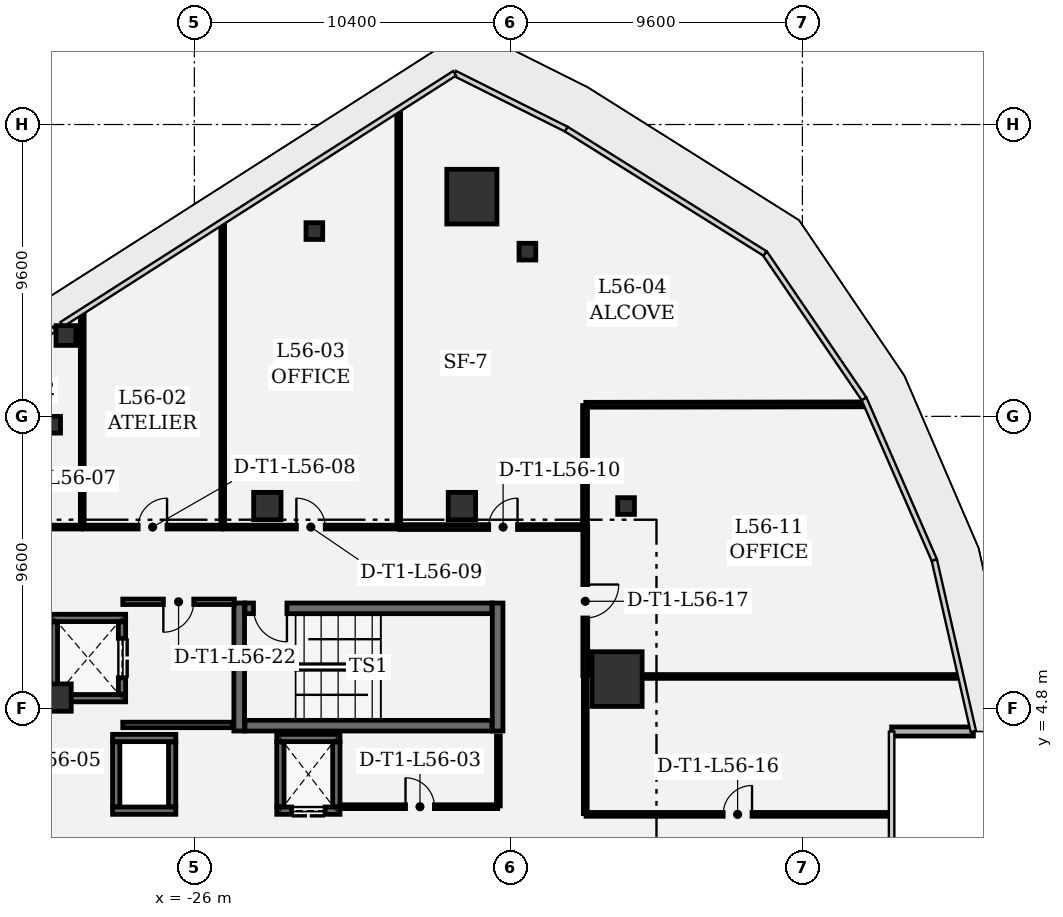
"""IFC4 building model, lengths in metres.
Left out: names, types, materials, properties, quantities, classifications, styles, units other than length and angle.
Written with IfcOpenShell. Run it as: python <this file> out.ifc"""

import sys

from ifc_helpers import new_model, si_unit, direction, frame, frame_2d, origin, origin_2d, place, context, subcontext, project, spatial, rectangle, extrude, element, fill, save


model = new_model("IFC4")
c1 = context("Model", 3, precision=1e-05, world=origin(), true_north=direction((0.0, 1.0)))
c2 = subcontext(c1, "Body", "Model", "MODEL_VIEW")
j1 = project(units=[si_unit("LENGTHUNIT", "METRE"), si_unit("PLANEANGLEUNIT", "RADIAN")], contexts=[c1])
p1 = place(None, origin())
s1 = spatial("IfcSite", under=j1, at=p1, CompositionType="ELEMENT")
p2 = place(p1, origin())
s2 = spatial("IfcBuilding", under=s1, at=p2, CompositionType="ELEMENT")
p3 = place(p2, frame((0.0, 0.0, 241.5)))
s3 = spatial("IfcBuildingStorey", under=s2, at=p3, CompositionType="ELEMENT", Elevation=241.5)
for number, where, z_axis, x_axis in (
    (1, (-12.097, 5.758, 0.0), (0.0, 0.0, 1.0), (1.0, 0.0, 0.0)),
    (2, (-16.872, 21.627, 0.0), (0.0, 0.0, 1.0), (1.0, 0.0, 0.0)),
):
    element("IfcColumn", number, at=place(p3, frame(where, z_axis=z_axis, x_axis=x_axis)), inside=s3, PredefinedType="COLUMN", context=c2, shape_type="SweptSolid", body=[
        extrude(rectangle(XDim=1.65, YDim=1.8, at=origin_2d()), origin(), (0.0, 0.0, 1.0), 4.05),
    ])
for number, where, z_axis, x_axis in (
    (3, (-23.6, 11.45, 0.0), (0.0, 0.0, 1.0), (1.0, 0.0, 0.0)),
    (4, (-17.2, 11.45, 0.0), (0.0, 0.0, 1.0), (1.0, 0.0, 0.0)),
    (5, (-30.5, 5.15, 0.0), (0.0, 0.0, 1.0), (1.0, 0.0, 0.0)),
):
    element("IfcColumn", number, at=place(p3, frame(where, z_axis=z_axis, x_axis=x_axis)), inside=s3, PredefinedType="COLUMN", context=c2, shape_type="SweptSolid", body=[
        extrude(rectangle(XDim=0.9, YDim=0.9, at=origin_2d()), origin(), (0.0, 0.0, 1.0), 4.05),
    ])
p4 = place(p3, frame((-30.225, 17.06, 0.0), z_axis=(0.0, 0.0, 1.0), x_axis=(1.0, 0.0, 0.0)))
e6 = element("IfcColumn", 6, at=p4, inside=s3, PredefinedType="COLUMN", context=c2, shape_type="SweptSolid", body=[
    extrude(rectangle(XDim=0.65, YDim=0.65, at=origin_2d()), origin(), (0.0, 0.0, 1.0), 4.05),
])
for number, where, z_axis, x_axis in (
    (7, (-22.053, 20.495, 0.0), (0.0, 0.0, 1.0), (1.0, 0.0, 0.0)),
    (8, (-30.677, 14.124, 0.0), (0.0, 0.0, 1.0), (1.0, 0.0, 0.0)),
    (9, (-15.046, 19.818, 0.0), (0.0, 0.0, 1.0), (1.0, 0.0, 0.0)),
    (10, (-11.8, 11.45, 0.0), (0.0, 0.0, 1.0), (1.0, 0.0, 0.0)),
):
    element("IfcColumn", number, at=place(p3, frame(where, z_axis=z_axis, x_axis=x_axis)), inside=s3, PredefinedType="COLUMN", context=c2, shape_type="SweptSolid", body=[
        extrude(rectangle(XDim=0.55, YDim=0.55, at=origin_2d()), origin(), (0.0, 0.0, 1.0), 4.05),
    ])
p5 = place(p3, frame((-3.066, 4.034, 0.0), z_axis=(0.0, 0.0, 1.0), x_axis=(1.0, 0.0, 0.0)))
e11 = element("IfcWall", 11, at=p5, inside=s3, PredefinedType="SOLIDWALL", context=c2, shape_type="SweptSolid", body=[
    extrude(rectangle(XDim=2.689, YDim=0.3, at=frame_2d((1.345, 0.0))), origin(), (0.0, 0.0, 1.0), 3.78),
])
for number, where, z_axis, x_axis in (
    (12, (-24.525, 8.26, 0.0), (0.0, 0.0, 1.0), (0.0, -1.0, 0.0)),
    (13, (-16.025, 4.05, 0.0), (0.0, 0.0, 1.0), (0.0, 1.0, 0.0)),
):
    element("IfcWall", number, at=place(p3, frame(where, z_axis=z_axis, x_axis=x_axis)), inside=s3, PredefinedType="SHEAR", context=c2, shape_type="SweptSolid", body=[
        extrude(rectangle(XDim=4.21, YDim=0.35, at=frame_2d((2.105, 0.0))), origin(), (0.0, 0.0, 1.0), 3.78),
    ])
p6 = place(p3, frame((-24.335, 4.225, 0.0), z_axis=(0.0, 0.0, 1.0), x_axis=(1.0, 0.0, 0.0)))
e14 = element("IfcWall", 14, at=p6, inside=s3, PredefinedType="SHEAR", context=c2, shape_type="SweptSolid", body=[
    extrude(rectangle(XDim=8.12, YDim=0.35, at=frame_2d((4.06, 0.0))), origin(), (0.0, 0.0, 1.0), 3.78),
])
p7 = place(p3, frame((-16.215, 8.085, 0.0), z_axis=(0.0, 0.0, 1.0), x_axis=(-1.0, 0.0, 0.0)))
e15 = element("IfcWall", 15, at=p7, inside=s3, PredefinedType="SHEAR", context=c2, shape_type="SweptSolid", body=[
    extrude(rectangle(XDim=8.12, YDim=0.35, at=frame_2d((4.06, 0.0))), origin(), (0.0, 0.0, 1.0), 3.78),
])
p8 = place(p7, frame((6.74, 0.0, 0.0)))
e16 = element("IfcOpeningElement", 16, at=p8, cuts=e15, PredefinedType="OPENING", context=c2, shape_type="SweptSolid", body=[
    extrude(rectangle(XDim=1.1, YDim=2.2, at=frame_2d((0.55, 1.1))), frame((0.0, 0.185, 0.0), z_axis=(0.0, -1.0, 0.0), x_axis=(1.0, 0.0, 0.0)), (0.0, 0.0, 1.0), 0.37),
])
for number, where, z_axis, x_axis in (
    (17, (-28.26, 5.13, 0.0), (0.0, 0.0, 1.0), (-1.0, 0.0, 0.0)),
    (18, (-30.74, 7.77, 0.0), (0.0, 0.0, 1.0), (1.0, 0.0, 0.0)),
):
    element("IfcWall", number, at=place(p3, frame(where, z_axis=z_axis, x_axis=x_axis)), inside=s3, PredefinedType="SHEAR", context=c2, shape_type="SweptSolid", body=[
        extrude(rectangle(XDim=2.48, YDim=0.24, at=frame_2d((1.24, 0.0))), origin(), (0.0, 0.0, 1.0), 3.78),
    ])
p9 = place(p3, frame((-30.62, 5.262, 0.0), z_axis=(0.0, 0.0, 1.0), x_axis=(0.0, 1.0, 0.0)))
e19 = element("IfcWall", 19, at=p9, inside=s3, PredefinedType="SHEAR", context=c2, shape_type="SweptSolid", body=[
    extrude(rectangle(XDim=2.376, YDim=0.24, at=frame_2d((1.188, 0.0))), origin(), (0.0, 0.0, 1.0), 3.78),
])
p10 = place(p3, frame((-28.38, 7.638, 0.0), z_axis=(0.0, 0.0, 1.0), x_axis=(0.0, -1.0, 0.0)))
e20 = element("IfcWall", 20, at=p10, inside=s3, PredefinedType="SHEAR", context=c2, shape_type="SweptSolid", body=[
    extrude(rectangle(XDim=2.376, YDim=0.24, at=frame_2d((1.188, 0.0))), origin(), (0.0, 0.0, 1.0), 3.78),
])
p11 = place(p10, frame((0.538, 0.0, 0.0)))
e21 = element("IfcOpeningElement", 21, at=p11, cuts=e20, PredefinedType="OPENING", context=c2, shape_type="SweptSolid", body=[
    extrude(rectangle(XDim=1.3, YDim=2.3, at=frame_2d((0.65, 1.15))), frame((0.0, 0.13, 0.0), z_axis=(0.0, -1.0, 0.0), x_axis=(1.0, 0.0, 0.0)), (0.0, 0.0, 1.0), 0.26),
])
for number, where, z_axis, x_axis in (
    (22, (-26.61, 1.43, 0.0), (0.0, 0.0, 1.0), (-1.0, 0.0, 0.0)),
    (23, (-28.69, 3.82, 0.0), (0.0, 0.0, 1.0), (1.0, 0.0, 0.0)),
):
    element("IfcWall", number, at=place(p3, frame(where, z_axis=z_axis, x_axis=x_axis)), inside=s3, PredefinedType="SHEAR", context=c2, shape_type="SweptSolid", body=[
        extrude(rectangle(XDim=2.08, YDim=0.24, at=frame_2d((1.04, 0.0))), origin(), (0.0, 0.0, 1.0), 3.78),
    ])
for number, where, z_axis, x_axis in (
    (24, (-28.57, 1.562, 0.0), (0.0, 0.0, 1.0), (0.0, 1.0, 0.0)),
    (25, (-26.73, 3.688, 0.0), (0.0, 0.0, 1.0), (0.0, -1.0, 0.0)),
):
    element("IfcWall", number, at=place(p3, frame(where, z_axis=z_axis, x_axis=x_axis)), inside=s3, PredefinedType="SHEAR", context=c2, shape_type="SweptSolid", body=[
        extrude(rectangle(XDim=2.126, YDim=0.24, at=frame_2d((1.063, 0.0))), origin(), (0.0, 0.0, 1.0), 3.78),
    ])
p12 = place(p3, frame((-21.21, 1.43, 0.0), z_axis=(0.0, 0.0, 1.0), x_axis=(-1.0, 0.0, 0.0)))
e26 = element("IfcWall", 26, at=p12, inside=s3, PredefinedType="SHEAR", context=c2, shape_type="SweptSolid", body=[
    extrude(rectangle(XDim=2.08, YDim=0.24, at=frame_2d((1.04, 0.0))), origin(), (0.0, 0.0, 1.0), 3.78),
])
p13 = place(p12, frame((0.49, 0.0, 0.0)))
e27 = element("IfcOpeningElement", 27, at=p13, cuts=e26, PredefinedType="OPENING", context=c2, shape_type="SweptSolid", body=[
    extrude(rectangle(XDim=1.1, YDim=2.2, at=frame_2d((0.55, 1.1))), frame((0.0, 0.13, 0.0), z_axis=(0.0, -1.0, 0.0), x_axis=(1.0, 0.0, 0.0)), (0.0, 0.0, 1.0), 0.26),
])
p14 = place(p3, frame((-23.29, 3.82, 0.0), z_axis=(0.0, 0.0, 1.0), x_axis=(1.0, 0.0, 0.0)))
e28 = element("IfcWall", 28, at=p14, inside=s3, PredefinedType="SHEAR", context=c2, shape_type="SweptSolid", body=[
    extrude(rectangle(XDim=2.08, YDim=0.24, at=frame_2d((1.04, 0.0))), origin(), (0.0, 0.0, 1.0), 3.78),
])
for number, where, z_axis, x_axis in (
    (29, (-23.17, 1.562, 0.0), (0.0, 0.0, 1.0), (0.0, 1.0, 0.0)),
    (30, (-21.33, 3.688, 0.0), (0.0, 0.0, 1.0), (0.0, -1.0, 0.0)),
):
    element("IfcWall", number, at=place(p3, frame(where, z_axis=z_axis, x_axis=x_axis)), inside=s3, PredefinedType="SHEAR", context=c2, shape_type="SweptSolid", body=[
        extrude(rectangle(XDim=2.126, YDim=0.24, at=frame_2d((1.063, 0.0))), origin(), (0.0, 0.0, 1.0), 3.78),
    ])
p15 = place(p3, frame((-28.355, 4.25, 0.0), z_axis=(0.0, 0.0, 1.0), x_axis=(1.0, 0.0, 0.0)))
e31 = element("IfcWall", 31, at=p15, inside=s3, PredefinedType="PARTITIONING", context=c2, shape_type="SweptSolid", body=[
    extrude(rectangle(XDim=3.622, YDim=0.18, at=frame_2d((1.811, 0.0))), origin(), (0.0, 0.0, 1.0), 3.78),
])
p16 = place(p3, frame((-24.684, 8.3, 0.0), z_axis=(0.0, 0.0, 1.0), x_axis=(-1.0, 0.0, 0.0)))
e32 = element("IfcWall", 32, at=p16, inside=s3, PredefinedType="PARTITIONING", context=c2, shape_type="SweptSolid", body=[
    extrude(rectangle(XDim=3.671, YDim=0.18, at=frame_2d((1.835, 0.0))), origin(), (0.0, 0.0, 1.0), 3.78),
])
p17 = place(p16, frame((1.335, 0.0, 0.0)))
e33 = element("IfcOpeningElement", 33, at=p17, cuts=e32, PredefinedType="OPENING", context=c2, shape_type="SweptSolid", body=[
    extrude(rectangle(XDim=1.0, YDim=2.15, at=frame_2d((0.5, 1.075))), frame((0.0, 0.1, 0.0), z_axis=(0.0, -1.0, 0.0), x_axis=(1.0, 0.0, 0.0)), (0.0, 0.0, 1.0), 0.2),
])
p18 = place(p3, frame((-21.134, 1.56, 0.0), z_axis=(0.0, 0.0, 1.0), x_axis=(1.0, 0.0, 0.0)))
e34 = element("IfcWall", 34, at=p18, inside=s3, PredefinedType="PARTITIONING", context=c2, shape_type="SweptSolid", body=[
    extrude(rectangle(XDim=5.109, YDim=0.125, at=frame_2d((2.554, 0.0))), origin(), (0.0, 0.0, 1.0), 3.78),
])
p19 = place(p18, frame((2.079, 0.0, 0.0)))
e35 = element("IfcOpeningElement", 35, at=p19, cuts=e34, PredefinedType="OPENING", context=c2, shape_type="SweptSolid", body=[
    extrude(rectangle(XDim=0.95, YDim=2.15, at=frame_2d((0.475, 1.075))), frame((0.0, 0.073, 0.0), z_axis=(0.0, -1.0, 0.0), x_axis=(1.0, 0.0, 0.0)), (0.0, 0.0, 1.0), 0.145),
])
p20 = place(p3, frame((-16.0, 1.585, 0.0), z_axis=(0.0, 0.0, 1.0), x_axis=(0.0, 1.0, 0.0)))
e36 = element("IfcWall", 36, at=p20, inside=s3, PredefinedType="PARTITIONING", context=c2, shape_type="SweptSolid", body=[
    extrude(rectangle(XDim=2.302, YDim=0.125, at=frame_2d((1.151, 0.0))), origin(), (0.0, 0.0, 1.0), 3.78),
])
p21 = place(p3, frame((-34.625, 10.758, 0.0), z_axis=(0.0, 0.0, 1.0), x_axis=(1.0, 0.0, 0.0)))
e37 = element("IfcWall", 37, at=p21, inside=s3, PredefinedType="PARTITIONING", context=c2, shape_type="SweptSolid", body=[
    extrude(rectangle(XDim=4.913, YDim=0.125, at=frame_2d((2.456, 0.0))), origin(), (0.0, 0.0, 1.0), 3.0),
])
p22 = place(p21, frame((1.981, 0.0, 0.0)))
e38 = element("IfcOpeningElement", 38, at=p22, cuts=e37, PredefinedType="OPENING", context=c2, shape_type="SweptSolid", body=[
    extrude(rectangle(XDim=0.95, YDim=2.15, at=frame_2d((0.475, 1.075))), frame((0.0, 0.073, 0.0), z_axis=(0.0, -1.0, 0.0), x_axis=(1.0, 0.0, 0.0)), (0.0, 0.0, 1.0), 0.145),
])
p23 = place(p3, frame((-29.687, 10.783, 0.0), z_axis=(0.0, 0.0, 1.0), x_axis=(0.0, 1.0, 0.0)))
e39 = element("IfcWall", 39, at=p23, inside=s3, PredefinedType="PARTITIONING", context=c2, shape_type="SweptSolid", body=[
    extrude(rectangle(XDim=6.992, YDim=0.125, at=frame_2d((3.496, 0.0))), origin(), (0.0, 0.0, 1.0), 3.78),
])
p24 = place(p3, frame((-29.654, 10.758, 0.0), z_axis=(0.0, 0.0, 1.0), x_axis=(1.0, 0.0, 0.0)))
e40 = element("IfcWall", 40, at=p24, inside=s3, PredefinedType="PARTITIONING", context=c2, shape_type="SweptSolid", body=[
    extrude(rectangle(XDim=4.562, YDim=0.125, at=frame_2d((2.281, 0.0))), origin(), (0.0, 0.0, 1.0), 3.78),
])
p25 = place(p24, frame((1.806, 0.0, 0.0)))
e41 = element("IfcOpeningElement", 41, at=p25, cuts=e40, PredefinedType="OPENING", context=c2, shape_type="SweptSolid", body=[
    extrude(rectangle(XDim=0.95, YDim=2.15, at=frame_2d((0.475, 1.075))), frame((0.0, 0.073, 0.0), z_axis=(0.0, -1.0, 0.0), x_axis=(1.0, 0.0, 0.0)), (0.0, 0.0, 1.0), 0.145),
])
p26 = place(p3, frame((-25.067, 10.783, 0.0), z_axis=(0.0, 0.0, 1.0), x_axis=(0.0, 1.0, 0.0)))
e42 = element("IfcWall", 42, at=p26, inside=s3, PredefinedType="PARTITIONING", context=c2, shape_type="SweptSolid", body=[
    extrude(rectangle(XDim=9.945, YDim=0.125, at=frame_2d((4.973, 0.0))), origin(), (0.0, 0.0, 1.0), 3.344),
])
p27 = place(p3, frame((-25.034, 10.758, 0.0), z_axis=(0.0, 0.0, 1.0), x_axis=(1.0, 0.0, 0.0)))
e43 = element("IfcWall", 43, at=p27, inside=s3, PredefinedType="PARTITIONING", context=c2, shape_type="SweptSolid", body=[
    extrude(rectangle(XDim=5.729, YDim=0.125, at=frame_2d((2.865, 0.0))), origin(), (0.0, 0.0, 1.0), 3.78),
])
p28 = place(p27, frame((2.39, 0.0, 0.0)))
e44 = element("IfcOpeningElement", 44, at=p28, cuts=e43, PredefinedType="OPENING", context=c2, shape_type="SweptSolid", body=[
    extrude(rectangle(XDim=0.95, YDim=2.15, at=frame_2d((0.475, 1.075))), frame((0.0, 0.073, 0.0), z_axis=(0.0, -1.0, 0.0), x_axis=(1.0, 0.0, 0.0)), (0.0, 0.0, 1.0), 0.145),
])
p29 = place(p3, frame((-19.28, 10.783, 0.0), z_axis=(0.0, 0.0, 1.0), x_axis=(0.0, 1.0, 0.0)))
e45 = element("IfcWall", 45, at=p29, inside=s3, PredefinedType="PARTITIONING", context=c2, shape_type="SweptSolid", body=[
    extrude(rectangle(XDim=13.644, YDim=0.125, at=frame_2d((6.822, 0.0))), origin(), (0.0, 0.0, 1.0), 2.977),
])
p30 = place(p3, frame((-19.247, 10.758, 0.0), z_axis=(0.0, 0.0, 1.0), x_axis=(1.0, 0.0, 0.0)))
e46 = element("IfcWall", 46, at=p30, inside=s3, PredefinedType="PARTITIONING", context=c2, shape_type="SweptSolid", body=[
    extrude(rectangle(XDim=6.072, YDim=0.16, at=frame_2d((3.036, 0.0))), origin(), (0.0, 0.0, 1.0), 3.344),
])
p31 = place(p30, frame((2.927, 0.0, 0.0)))
e47 = element("IfcOpeningElement", 47, at=p31, cuts=e46, PredefinedType="OPENING", context=c2, shape_type="SweptSolid", body=[
    extrude(rectangle(XDim=0.95, YDim=2.15, at=frame_2d((0.475, 1.075))), frame((0.0, 0.09, 0.0), z_axis=(0.0, -1.0, 0.0), x_axis=(1.0, 0.0, 0.0)), (0.0, 0.0, 1.0), 0.18),
])
p32 = place(p3, frame((-13.15, 10.783, 0.0), z_axis=(0.0, 0.0, 1.0), x_axis=(0.0, 1.0, 0.0)))
e48 = element("IfcWall", 48, at=p32, inside=s3, PredefinedType="PARTITIONING", context=c2, shape_type="SweptSolid", body=[
    extrude(rectangle(XDim=3.973, YDim=0.16, at=frame_2d((1.987, 0.0))), origin(), (0.0, 0.0, 1.0), 3.0),
])
p33 = place(p3, frame((-13.125, 14.781, 0.0), z_axis=(0.0, 0.0, 1.0), x_axis=(0.999999000233, 0.001414048372, 0.0)))
e49 = element("IfcWall", 49, at=p33, inside=s3, PredefinedType="PARTITIONING", context=c2, shape_type="SweptSolid", body=[
    extrude(rectangle(XDim=9.151, YDim=0.16, at=frame_2d((4.575, 0.0))), origin(), (0.0, 0.0, 1.0), 3.78),
])
p34 = place(p3, frame((-0.87, 5.844, 0.0), z_axis=(0.0, 0.0, 1.0), x_axis=(-1.0, 0.0, 0.0)))
e50 = element("IfcWall", 50, at=p34, inside=s3, PredefinedType="PARTITIONING", context=c2, shape_type="SweptSolid", body=[
    extrude(rectangle(XDim=10.337, YDim=0.125, at=frame_2d((5.168, 0.0))), origin(), (0.0, 0.0, 1.0), 3.78),
])
p35 = place(p3, frame((-13.142, 5.819, 0.0), z_axis=(0.0, 0.0, 1.0), x_axis=(0.0, -1.0, 0.0)))
e51 = element("IfcWall", 51, at=p35, inside=s3, PredefinedType="PARTITIONING", context=c2, shape_type="SweptSolid", body=[
    extrude(rectangle(XDim=4.486, YDim=0.125, at=frame_2d((2.243, 0.0))), origin(), (0.0, 0.0, 1.0), 3.78),
])
p36 = place(p3, frame((-13.117, 1.308, 0.0), z_axis=(0.0, 0.0, 1.0), x_axis=(1.0, 0.0, 0.0)))
e52 = element("IfcWall", 52, at=p36, inside=s3, PredefinedType="PARTITIONING", context=c2, shape_type="SweptSolid", body=[
    extrude(rectangle(XDim=9.971, YDim=0.125, at=frame_2d((4.985, 0.0))), origin(), (0.0, 0.0, 1.0), 3.78),
])
p37 = place(p36, frame((4.51, 0.0, 0.0)))
e53 = element("IfcOpeningElement", 53, at=p37, cuts=e52, PredefinedType="OPENING", context=c2, shape_type="SweptSolid", body=[
    extrude(rectangle(XDim=0.95, YDim=2.15, at=frame_2d((0.475, 1.075))), frame((0.0, 0.073, 0.0), z_axis=(0.0, -1.0, 0.0), x_axis=(1.0, 0.0, 0.0)), (0.0, 0.0, 1.0), 0.145),
])
p38 = place(p3, frame((-13.142, 10.758, 0.0), z_axis=(0.0, 0.0, 1.0), x_axis=(0.0, -1.0, 0.0)))
e54 = element("IfcWall", 54, at=p38, inside=s3, PredefinedType="PARTITIONING", context=c2, shape_type="SweptSolid", body=[
    extrude(rectangle(XDim=4.881, YDim=0.16, at=frame_2d((2.44, 0.0))), origin(), (0.0, 0.0, 1.0), 3.0),
])
p39 = place(p38, frame((1.891, 0.0, 0.0)))
e55 = element("IfcOpeningElement", 55, at=p39, cuts=e54, PredefinedType="OPENING", context=c2, shape_type="SweptSolid", body=[
    extrude(rectangle(XDim=1.1, YDim=2.15, at=frame_2d((0.55, 1.075))), frame((0.0, 0.09, 0.0), z_axis=(0.0, -1.0, 0.0), x_axis=(1.0, 0.0, 0.0)), (0.0, 0.0, 1.0), 0.18),
])
p40 = place(p8, origin())
e56 = element("IfcDoor", 56, at=p40, inside=s3, OperationType="SINGLE_SWING_LEFT", PredefinedType="DOOR", context=c2, shape_type="SweptSolid", body=[
    extrude(rectangle(XDim=1.1, YDim=2.2, at=frame_2d((0.55, 1.1))), frame((0.0, 0.025, 0.0), z_axis=(0.0, -1.0, 0.0), x_axis=(1.0, 0.0, 0.0)), (0.0, 0.0, 1.0), 0.05),
])
fill(e16, e56)
p41 = place(p11, origin())
e57 = element("IfcDoor", 57, at=p41, inside=s3, OperationType="DOUBLE_DOOR_SLIDING", PredefinedType="DOOR", context=c2, shape_type="SweptSolid", body=[
    extrude(rectangle(XDim=1.3, YDim=2.3, at=frame_2d((0.65, 1.15))), frame((0.0, 0.025, 0.0), z_axis=(0.0, -1.0, 0.0), x_axis=(1.0, 0.0, 0.0)), (0.0, 0.0, 1.0), 0.05),
])
fill(e21, e57)
p42 = place(p13, origin())
e58 = element("IfcDoor", 58, at=p42, inside=s3, OperationType="DOUBLE_DOOR_SLIDING", PredefinedType="DOOR", context=c2, shape_type="SweptSolid", body=[
    extrude(rectangle(XDim=1.1, YDim=2.2, at=frame_2d((0.55, 1.1))), frame((0.0, 0.025, 0.0), z_axis=(0.0, -1.0, 0.0), x_axis=(1.0, 0.0, 0.0)), (0.0, 0.0, 1.0), 0.05),
])
fill(e27, e58)
p43 = place(p19, origin())
e59 = element("IfcDoor", 59, at=p43, inside=s3, OperationType="SINGLE_SWING_LEFT", PredefinedType="DOOR", context=c2, shape_type="SweptSolid", body=[
    extrude(rectangle(XDim=0.95, YDim=2.15, at=frame_2d((0.475, 1.075))), frame((0.0, 0.025, 0.0), z_axis=(0.0, -1.0, 0.0), x_axis=(1.0, 0.0, 0.0)), (0.0, 0.0, 1.0), 0.05),
])
fill(e35, e59)
p44 = place(p25, origin())
e60 = element("IfcDoor", 60, at=p44, inside=s3, OperationType="SINGLE_SWING_RIGHT", PredefinedType="DOOR", context=c2, shape_type="SweptSolid", body=[
    extrude(rectangle(XDim=0.95, YDim=2.15, at=frame_2d((0.475, 1.075))), frame((0.0, 0.025, 0.0), z_axis=(0.0, -1.0, 0.0), x_axis=(1.0, 0.0, 0.0)), (0.0, 0.0, 1.0), 0.05),
])
fill(e41, e60)
p45 = place(p28, origin())
e61 = element("IfcDoor", 61, at=p45, inside=s3, OperationType="SINGLE_SWING_LEFT", PredefinedType="DOOR", context=c2, shape_type="SweptSolid", body=[
    extrude(rectangle(XDim=0.95, YDim=2.15, at=frame_2d((0.475, 1.075))), frame((0.0, 0.025, 0.0), z_axis=(0.0, -1.0, 0.0), x_axis=(1.0, 0.0, 0.0)), (0.0, 0.0, 1.0), 0.05),
])
fill(e44, e61)
p46 = place(p31, origin())
e62 = element("IfcDoor", 62, at=p46, inside=s3, OperationType="SINGLE_SWING_RIGHT", PredefinedType="DOOR", context=c2, shape_type="SweptSolid", body=[
    extrude(rectangle(XDim=0.95, YDim=2.15, at=frame_2d((0.475, 1.075))), frame((0.0, 0.025, 0.0), z_axis=(0.0, -1.0, 0.0), x_axis=(1.0, 0.0, 0.0)), (0.0, 0.0, 1.0), 0.05),
])
fill(e47, e62)
p47 = place(p37, origin())
e63 = element("IfcDoor", 63, at=p47, inside=s3, OperationType="SINGLE_SWING_RIGHT", PredefinedType="DOOR", context=c2, shape_type="SweptSolid", body=[
    extrude(rectangle(XDim=0.95, YDim=2.15, at=frame_2d((0.475, 1.075))), frame((0.0, 0.025, 0.0), z_axis=(0.0, -1.0, 0.0), x_axis=(1.0, 0.0, 0.0)), (0.0, 0.0, 1.0), 0.05),
])
fill(e53, e63)
p48 = place(p39, origin())
e64 = element("IfcDoor", 64, at=p48, inside=s3, OperationType="SINGLE_SWING_LEFT", PredefinedType="DOOR", context=c2, shape_type="SweptSolid", body=[
    extrude(rectangle(XDim=1.1, YDim=2.15, at=frame_2d((0.55, 1.075))), frame((0.0, 0.025, 0.0), z_axis=(0.0, -1.0, 0.0), x_axis=(1.0, 0.0, 0.0)), (0.0, 0.0, 1.0), 0.05),
])
fill(e55, e64)
p49 = place(p17, origin())
e65 = element("IfcDoor", 65, at=p49, inside=s3, OperationType="SINGLE_SWING_RIGHT", PredefinedType="DOOR", context=c2, shape_type="SweptSolid", body=[
    extrude(rectangle(XDim=1.0, YDim=2.15, at=frame_2d((0.5, 1.075))), frame((0.0, 0.025, 0.0), z_axis=(0.0, -1.0, 0.0), x_axis=(1.0, 0.0, 0.0)), (0.0, 0.0, 1.0), 0.05),
])
fill(e33, e65)
save(model, sys.argv[1])
